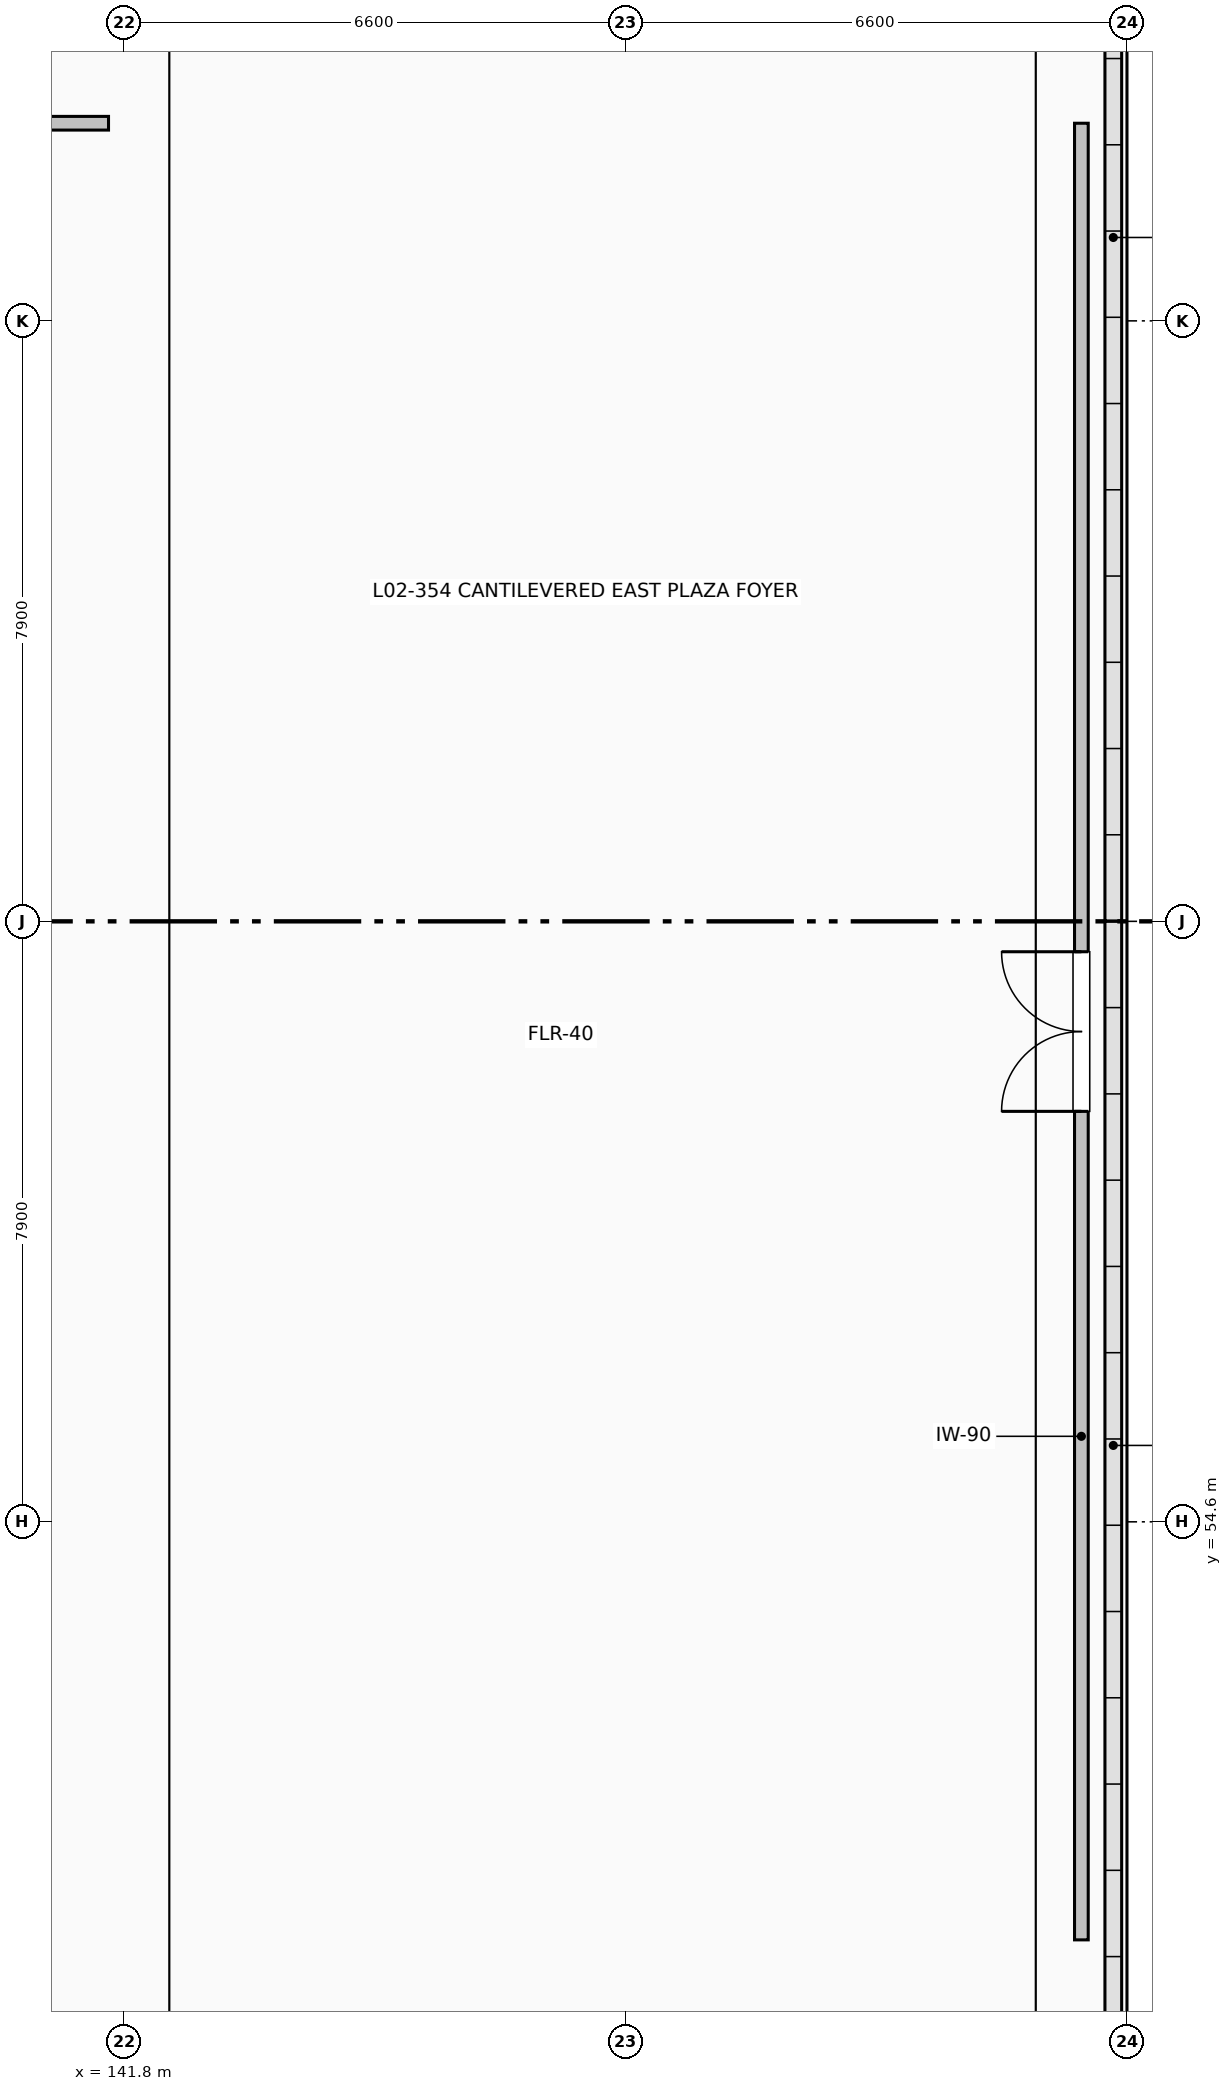
"""IFC4 building model, lengths in metres.
Left out: names, types, materials, properties, quantities, classifications, styles, units other than length and angle.
Written with IfcOpenShell. Run it as: python <this file> out.ifc"""

import sys

from ifc_helpers import new_model, si_unit, direction, frame, frame_2d, origin, place, context, subcontext, project, spatial, rectangle, extrude, element, fill, save


model = new_model("IFC4")
c1 = context("Model", 3, precision=1e-05, world=origin(), true_north=direction((0.0, 1.0)))
c2 = subcontext(c1, "Body", "Model", "MODEL_VIEW")
j1 = project(units=[si_unit("LENGTHUNIT", "METRE"), si_unit("PLANEANGLEUNIT", "RADIAN")], contexts=[c1])
p1 = place(None, origin())
s1 = spatial("IfcSite", under=j1, at=p1, CompositionType="ELEMENT")
p2 = place(p1, origin())
s2 = spatial("IfcBuilding", under=s1, at=p2, CompositionType="ELEMENT")
p3 = place(p2, frame((0.0, 0.0, 10.2)))
s3 = spatial("IfcBuildingStorey", under=s2, at=p3, CompositionType="ELEMENT", Elevation=10.2)
p4 = place(p3, frame((115.0, 73.0, 0.0), z_axis=(0.0, 0.0, 1.0), x_axis=(1.0, 0.0, 0.0)))
e1 = element("IfcWall", 1, at=p4, inside=s3, PredefinedType="PARTITIONING", context=c2, shape_type="SweptSolid", body=[
    extrude(rectangle(XDim=26.6, YDim=0.18, at=frame_2d((13.3, 0.0))), origin(), (0.0, 0.0, 1.0), 4.472),
])
p5 = place(p4, frame((12.4, 0.0, 0.0)))
e2 = element("IfcOpeningElement", 2, at=p5, cuts=e1, PredefinedType="OPENING", context=c2, shape_type="SweptSolid", body=[
    extrude(rectangle(XDim=1.8, YDim=2.2, at=frame_2d((0.9, 1.1))), frame((0.0, 0.1, 0.0), z_axis=(0.0, -1.0, 0.0), x_axis=(1.0, 0.0, 0.0)), (0.0, 0.0, 1.0), 0.2),
])
p6 = place(p3, frame((154.4, 49.1, 0.0), z_axis=(0.0, 0.0, 1.0), x_axis=(0.0, 1.0, 0.0)))
e3 = element("IfcWall", 3, at=p6, inside=s3, PredefinedType="PARTITIONING", context=c2, shape_type="SweptSolid", body=[
    extrude(rectangle(XDim=23.9, YDim=0.18, at=frame_2d((11.95, 0.0))), origin(), (0.0, 0.0, 1.0), 4.472),
])
p7 = place(p6, frame((10.9, 0.0, 0.0)))
e4 = element("IfcOpeningElement", 4, at=p7, cuts=e3, PredefinedType="OPENING", context=c2, shape_type="SweptSolid", body=[
    extrude(rectangle(XDim=2.1, YDim=2.25, at=frame_2d((1.05, 1.125))), frame((0.0, 0.1, 0.0), z_axis=(0.0, -1.0, 0.0), x_axis=(1.0, 0.0, 0.0)), (0.0, 0.0, 1.0), 0.2),
])
p8 = place(p7, origin())
e5 = element("IfcDoor", 5, at=p8, inside=s3, OperationType="DOUBLE_DOOR_SINGLE_SWING", PredefinedType="DOOR", context=c2, shape_type="SweptSolid", body=[
    extrude(rectangle(XDim=2.1, YDim=2.25, at=frame_2d((1.05, 1.125))), frame((0.0, 0.025, 0.0), z_axis=(0.0, -1.0, 0.0), x_axis=(1.0, 0.0, 0.0)), (0.0, 0.0, 1.0), 0.05),
])
fill(e4, e5)
save(model, sys.argv[1])
